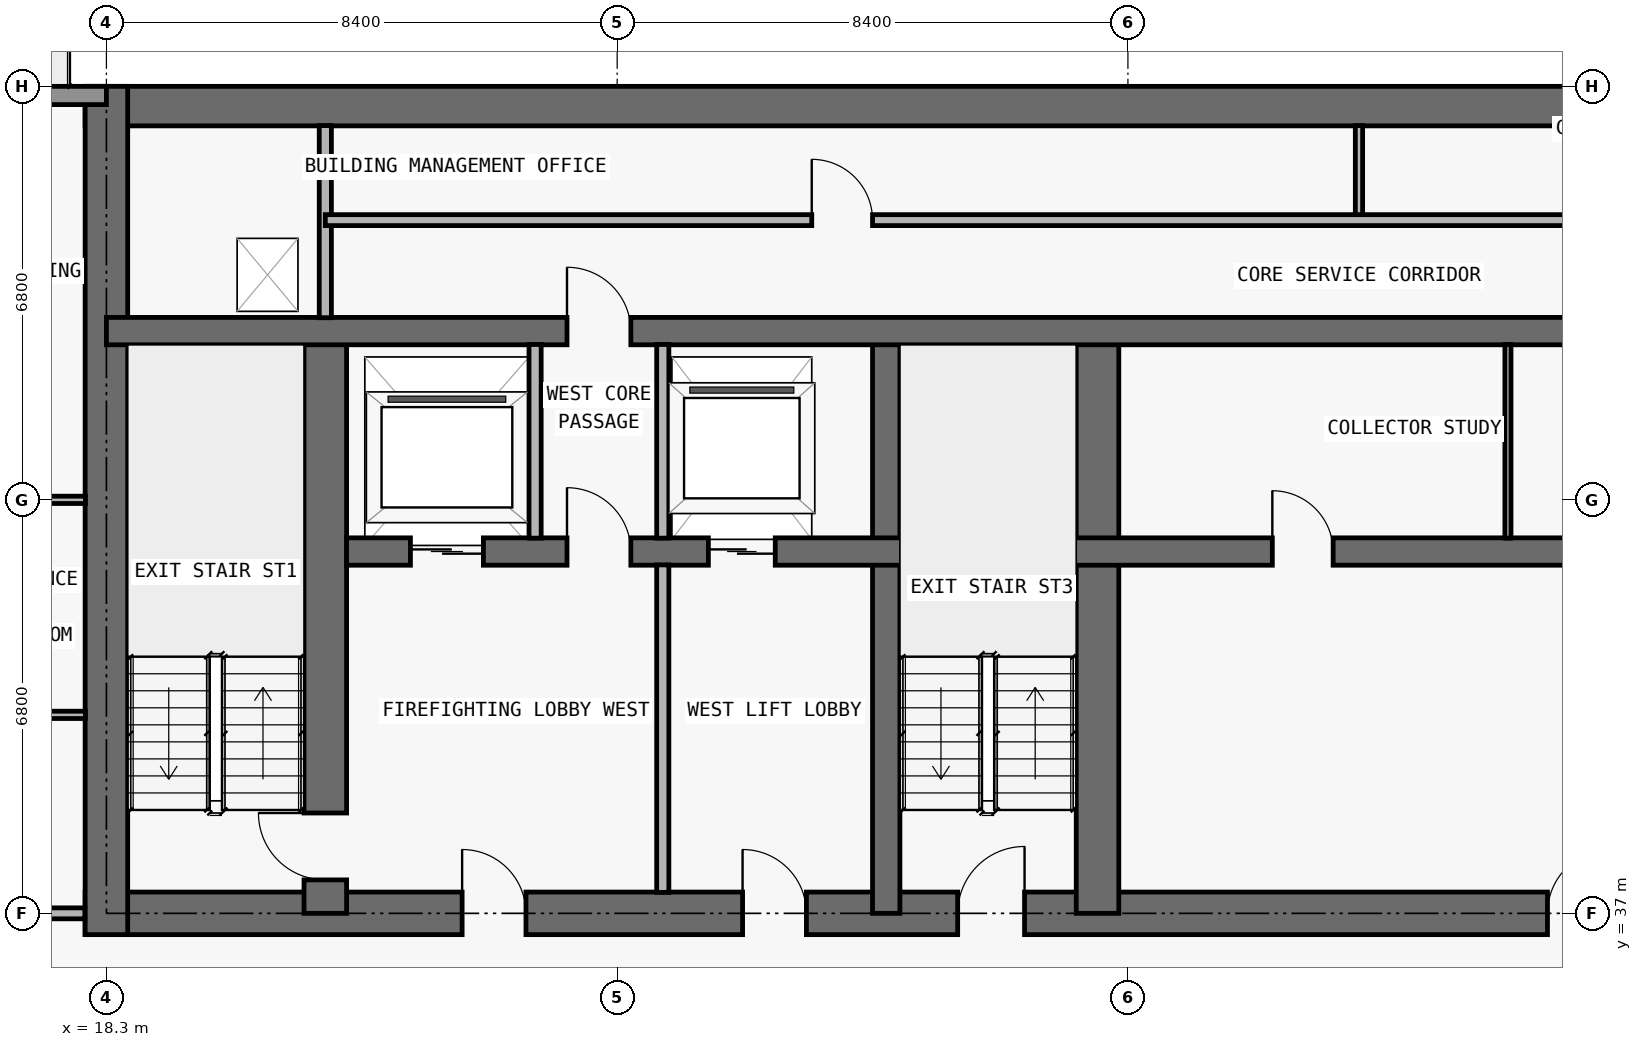
"""IFC4 building model, lengths in metres.
Left out: names, types, materials, properties, quantities, classifications, styles, units other than length and angle.
Written with IfcOpenShell. Run it as: python <this file> out.ifc"""

import sys

from ifc_helpers import new_model, si_unit, direction, frame, frame_2d, origin, place, context, subcontext, project, spatial, rectangle, extrude, element, fill, save


model = new_model("IFC4")
c1 = context("Model", 3, precision=1e-05, world=origin(), true_north=direction((0.0, 1.0)))
c2 = subcontext(c1, "Body", "Model", "MODEL_VIEW")
j1 = project(units=[si_unit("LENGTHUNIT", "METRE"), si_unit("PLANEANGLEUNIT", "RADIAN")], contexts=[c1])
p1 = place(None, origin())
s1 = spatial("IfcSite", under=j1, at=p1, CompositionType="ELEMENT")
p2 = place(p1, origin())
s2 = spatial("IfcBuilding", under=s1, at=p2, CompositionType="ELEMENT")
p3 = place(p2, frame((0.0, 0.0, 259.5)))
s3 = spatial("IfcBuildingStorey", under=s2, at=p3, CompositionType="ELEMENT", Elevation=259.5)
p4 = place(p3, frame((17.95, 37.0, 0.0), z_axis=(0.0, 0.0, 1.0), x_axis=(1.0, 0.0, 0.0)))
e1 = element("IfcWall", 1, at=p4, inside=s3, PredefinedType="SHEAR", context=c2, shape_type="SweptSolid", body=[
    extrude(rectangle(XDim=41.9, YDim=0.7, at=frame_2d((20.95, 0.0))), origin(), (0.0, 0.0, 1.0), 3.05),
])
p5 = place(p4, frame((14.35, 0.0, 0.0)))
e2 = element("IfcOpeningElement", 2, at=p5, cuts=e1, PredefinedType="OPENING", context=c2, shape_type="SweptSolid", body=[
    extrude(rectangle(XDim=1.1, YDim=2.15, at=frame_2d((0.55, 1.075))), frame((0.0, 0.36, 0.0), z_axis=(0.0, -1.0, 0.0), x_axis=(1.0, 0.0, 0.0)), (0.0, 0.0, 1.0), 0.72),
])
p6 = place(p4, frame((6.2, 0.0, 0.0)))
e3 = element("IfcOpeningElement", 3, at=p6, cuts=e1, PredefinedType="OPENING", context=c2, shape_type="SweptSolid", body=[
    extrude(rectangle(XDim=1.05, YDim=2.15, at=frame_2d((0.525, 1.075))), frame((0.0, 0.36, 0.0), z_axis=(0.0, -1.0, 0.0), x_axis=(1.0, 0.0, 0.0)), (0.0, 0.0, 1.0), 0.72),
])
p7 = place(p4, frame((34.7, 0.0, 0.0)))
e4 = element("IfcOpeningElement", 4, at=p7, cuts=e1, PredefinedType="OPENING", context=c2, shape_type="SweptSolid", body=[
    extrude(rectangle(XDim=1.05, YDim=2.15, at=frame_2d((0.525, 1.075))), frame((0.0, 0.36, 0.0), z_axis=(0.0, -1.0, 0.0), x_axis=(1.0, 0.0, 0.0)), (0.0, 0.0, 1.0), 0.72),
])
p8 = place(p4, frame((10.812, 0.0, 0.0)))
e5 = element("IfcOpeningElement", 5, at=p8, cuts=e1, PredefinedType="OPENING", context=c2, shape_type="SweptSolid", body=[
    extrude(rectangle(XDim=1.05, YDim=2.15, at=frame_2d((0.525, 1.075))), frame((0.0, 0.36, 0.0), z_axis=(0.0, -1.0, 0.0), x_axis=(1.0, 0.0, 0.0)), (0.0, 0.0, 1.0), 0.72),
])
p9 = place(p4, frame((24.05, 0.0, 0.0)))
e6 = element("IfcOpeningElement", 6, at=p9, cuts=e1, PredefinedType="OPENING", context=c2, shape_type="SweptSolid", body=[
    extrude(rectangle(XDim=1.05, YDim=2.15, at=frame_2d((0.525, 1.075))), frame((0.0, 0.36, 0.0), z_axis=(0.0, -1.0, 0.0), x_axis=(1.0, 0.0, 0.0)), (0.0, 0.0, 1.0), 0.72),
])
p10 = place(p3, frame((17.95, 50.275, 0.0), z_axis=(0.0, 0.0, 1.0), x_axis=(1.0, 0.0, 0.0)))
e7 = element("IfcWall", 7, at=p10, inside=s3, PredefinedType="SHEAR", context=c2, shape_type="SweptSolid", body=[
    extrude(rectangle(XDim=41.9, YDim=0.65, at=frame_2d((20.95, 0.0))), origin(), (0.0, 0.0, 1.0), 3.05),
])
p11 = place(p3, frame((18.3, 36.65, 0.0), z_axis=(0.0, 0.0, 1.0), x_axis=(0.0, 1.0, 0.0)))
e8 = element("IfcWall", 8, at=p11, inside=s3, PredefinedType="SHEAR", context=c2, shape_type="SweptSolid", body=[
    extrude(rectangle(XDim=13.95, YDim=0.7, at=frame_2d((6.975, 0.0))), origin(), (0.0, 0.0, 1.0), 3.05),
])
p12 = place(p3, frame((21.9, 37.0, 0.0), z_axis=(0.0, 0.0, 1.0), x_axis=(0.0, 1.0, 0.0)))
e9 = element("IfcWall", 9, at=p12, inside=s3, PredefinedType="SHEAR", context=c2, shape_type="SweptSolid", body=[
    extrude(rectangle(XDim=9.575, YDim=0.7, at=frame_2d((4.788, 0.0))), origin(), (0.0, 0.0, 1.0), 3.05),
])
p13 = place(p12, frame((0.55, 0.0, 0.0)))
e10 = element("IfcOpeningElement", 10, at=p13, cuts=e9, PredefinedType="OPENING", context=c2, shape_type="SweptSolid", body=[
    extrude(rectangle(XDim=1.1, YDim=2.15, at=frame_2d((0.55, 1.075))), frame((0.0, 0.36, 0.0), z_axis=(0.0, -1.0, 0.0), x_axis=(1.0, 0.0, 0.0)), (0.0, 0.0, 1.0), 0.72),
])
p14 = place(p3, frame((31.125, 37.0, 0.0), z_axis=(0.0, 0.0, 1.0), x_axis=(0.0, 1.0, 0.0)))
e11 = element("IfcWall", 11, at=p14, inside=s3, PredefinedType="SHEAR", context=c2, shape_type="SweptSolid", body=[
    extrude(rectangle(XDim=9.575, YDim=0.45, at=frame_2d((4.788, 0.0))), origin(), (0.0, 0.0, 1.0), 3.05),
])
p15 = place(p3, frame((34.6, 37.0, 0.0), z_axis=(0.0, 0.0, 1.0), x_axis=(0.0, 1.0, 0.0)))
e12 = element("IfcWall", 12, at=p15, inside=s3, PredefinedType="SHEAR", context=c2, shape_type="SweptSolid", body=[
    extrude(rectangle(XDim=9.575, YDim=0.7, at=frame_2d((4.788, 0.0))), origin(), (0.0, 0.0, 1.0), 3.05),
])
p16 = place(p3, frame((22.25, 42.95, 0.0), z_axis=(0.0, 0.0, 1.0), x_axis=(1.0, 0.0, 0.0)))
e13 = element("IfcWall", 13, at=p16, inside=s3, PredefinedType="SHEAR", context=c2, shape_type="SweptSolid", body=[
    extrude(rectangle(XDim=33.3, YDim=0.45, at=frame_2d((16.65, 0.0))), origin(), (0.0, 0.0, 1.0), 3.05),
])
p17 = place(p16, frame((1.05, 0.0, 0.0)))
e14 = element("IfcOpeningElement", 14, at=p17, cuts=e13, PredefinedType="OPENING", context=c2, shape_type="SweptSolid", body=[
    extrude(rectangle(XDim=1.2, YDim=2.2, at=frame_2d((0.6, 1.1))), frame((0.0, 0.235, 0.0), z_axis=(0.0, -1.0, 0.0), x_axis=(1.0, 0.0, 0.0)), (0.0, 0.0, 1.0), 0.47),
])
p18 = place(p16, frame((31.05, 0.0, 0.0)))
e15 = element("IfcOpeningElement", 15, at=p18, cuts=e13, PredefinedType="OPENING", context=c2, shape_type="SweptSolid", body=[
    extrude(rectangle(XDim=1.2, YDim=2.2, at=frame_2d((0.6, 1.1))), frame((0.0, 0.235, 0.0), z_axis=(0.0, -1.0, 0.0), x_axis=(1.0, 0.0, 0.0)), (0.0, 0.0, 1.0), 0.47),
])
p19 = place(p16, frame((26.45, 0.0, 0.0)))
e16 = element("IfcOpeningElement", 16, at=p19, cuts=e13, PredefinedType="OPENING", context=c2, shape_type="SweptSolid", body=[
    extrude(rectangle(XDim=1.1, YDim=2.2, at=frame_2d((0.55, 1.1))), frame((0.0, 0.235, 0.0), z_axis=(0.0, -1.0, 0.0), x_axis=(1.0, 0.0, 0.0)), (0.0, 0.0, 1.0), 0.47),
])
p20 = place(p16, frame((5.95, 0.0, 0.0)))
e17 = element("IfcOpeningElement", 17, at=p20, cuts=e13, PredefinedType="OPENING", context=c2, shape_type="SweptSolid", body=[
    extrude(rectangle(XDim=1.1, YDim=2.2, at=frame_2d((0.55, 1.1))), frame((0.0, 0.235, 0.0), z_axis=(0.0, -1.0, 0.0), x_axis=(1.0, 0.0, 0.0)), (0.0, 0.0, 1.0), 0.47),
])
p21 = place(p16, frame((3.625, 0.0, 0.0)))
e18 = element("IfcOpeningElement", 18, at=p21, cuts=e13, PredefinedType="OPENING", context=c2, shape_type="SweptSolid", body=[
    extrude(rectangle(XDim=1.05, YDim=2.15, at=frame_2d((0.525, 1.075))), frame((0.0, 0.235, 0.0), z_axis=(0.0, -1.0, 0.0), x_axis=(1.0, 0.0, 0.0)), (0.0, 0.0, 1.0), 0.47),
])
p22 = place(p16, frame((28.675, 0.0, 0.0)))
e19 = element("IfcOpeningElement", 19, at=p22, cuts=e13, PredefinedType="OPENING", context=c2, shape_type="SweptSolid", body=[
    extrude(rectangle(XDim=1.05, YDim=2.15, at=frame_2d((0.525, 1.075))), frame((0.0, 0.235, 0.0), z_axis=(0.0, -1.0, 0.0), x_axis=(1.0, 0.0, 0.0)), (0.0, 0.0, 1.0), 0.47),
])
p23 = place(p16, frame((15.225, 0.0, 0.0)))
e20 = element("IfcOpeningElement", 20, at=p23, cuts=e13, PredefinedType="OPENING", context=c2, shape_type="SweptSolid", body=[
    extrude(rectangle(XDim=1.0, YDim=2.2, at=frame_2d((0.5, 1.1))), frame((0.0, 0.235, 0.0), z_axis=(0.0, -1.0, 0.0), x_axis=(1.0, 0.0, 0.0)), (0.0, 0.0, 1.0), 0.47),
])
p24 = place(p16, frame((21.975, 0.0, 0.0)))
e21 = element("IfcOpeningElement", 21, at=p24, cuts=e13, PredefinedType="OPENING", context=c2, shape_type="SweptSolid", body=[
    extrude(rectangle(XDim=1.0, YDim=2.2, at=frame_2d((0.5, 1.1))), frame((0.0, 0.235, 0.0), z_axis=(0.0, -1.0, 0.0), x_axis=(1.0, 0.0, 0.0)), (0.0, 0.0, 1.0), 0.47),
])
p25 = place(p3, frame((18.3, 46.575, 0.0), z_axis=(0.0, 0.0, 1.0), x_axis=(1.0, 0.0, 0.0)))
e22 = element("IfcWall", 22, at=p25, inside=s3, PredefinedType="SHEAR", context=c2, shape_type="SweptSolid", body=[
    extrude(rectangle(XDim=41.2, YDim=0.45, at=frame_2d((20.6, 0.0))), origin(), (0.0, 0.0, 1.0), 3.05),
])
p26 = place(p25, frame((7.575, 0.0, 0.0)))
e23 = element("IfcOpeningElement", 23, at=p26, cuts=e22, PredefinedType="OPENING", context=c2, shape_type="SweptSolid", body=[
    extrude(rectangle(XDim=1.05, YDim=2.15, at=frame_2d((0.525, 1.075))), frame((0.0, 0.235, 0.0), z_axis=(0.0, -1.0, 0.0), x_axis=(1.0, 0.0, 0.0)), (0.0, 0.0, 1.0), 0.47),
])
p27 = place(p25, frame((32.625, 0.0, 0.0)))
e24 = element("IfcOpeningElement", 24, at=p27, cuts=e22, PredefinedType="OPENING", context=c2, shape_type="SweptSolid", body=[
    extrude(rectangle(XDim=1.05, YDim=2.15, at=frame_2d((0.525, 1.075))), frame((0.0, 0.235, 0.0), z_axis=(0.0, -1.0, 0.0), x_axis=(1.0, 0.0, 0.0)), (0.0, 0.0, 1.0), 0.47),
])
p28 = place(p3, frame((12.1, 50.45, 0.0), z_axis=(0.0, 0.0, 1.0), x_axis=(1.0, 0.0, 0.0)))
e25 = element("IfcWall", 25, at=p28, inside=s3, PredefinedType="STANDARD", context=c2, shape_type="SweptSolid", body=[
    extrude(rectangle(XDim=6.2, YDim=0.3, at=frame_2d((3.1, 0.0))), origin(), (0.0, 0.0, 1.0), 3.05),
])
p29 = place(p28, frame((2.1, 0.0, 0.0)))
e26 = element("IfcOpeningElement", 26, at=p29, cuts=e25, PredefinedType="OPENING", context=c2, shape_type="SweptSolid", body=[
    extrude(rectangle(XDim=2.0, YDim=2.3, at=frame_2d((1.0, 1.15))), frame((0.0, 0.16, 0.0), z_axis=(0.0, -1.0, 0.0), x_axis=(1.0, 0.0, 0.0)), (0.0, 0.0, 1.0), 0.32),
])
p30 = place(p3, frame((21.9, 46.795, 0.0), z_axis=(0.0, 0.0, 1.0), x_axis=(0.0, 1.0, 0.0)))
e27 = element("IfcWall", 27, at=p30, inside=s3, PredefinedType="PARTITIONING", context=c2, shape_type="SweptSolid", body=[
    extrude(rectangle(XDim=3.16, YDim=0.2, at=frame_2d((1.58, 0.0))), origin(), (0.0, 0.0, 1.0), 3.05),
])
p31 = place(p3, frame((25.35, 43.17, 0.0), z_axis=(0.0, 0.0, 1.0), x_axis=(0.0, 1.0, 0.0)))
e28 = element("IfcWall", 28, at=p31, inside=s3, PredefinedType="PARTITIONING", context=c2, shape_type="SweptSolid", body=[
    extrude(rectangle(XDim=3.185, YDim=0.2, at=frame_2d((1.593, 0.0))), origin(), (0.0, 0.0, 1.0), 3.05),
])
p32 = place(p3, frame((27.45, 37.345, 0.0), z_axis=(0.0, 0.0, 1.0), x_axis=(0.0, 1.0, 0.0)))
e29 = element("IfcWall", 29, at=p32, inside=s3, PredefinedType="PARTITIONING", context=c2, shape_type="SweptSolid", body=[
    extrude(rectangle(XDim=5.385, YDim=0.2, at=frame_2d((2.692, 0.0))), origin(), (0.0, 0.0, 1.0), 3.05),
])
p33 = place(p3, frame((27.45, 43.17, 0.0), z_axis=(0.0, 0.0, 1.0), x_axis=(0.0, 1.0, 0.0)))
e30 = element("IfcWall", 30, at=p33, inside=s3, PredefinedType="PARTITIONING", context=c2, shape_type="SweptSolid", body=[
    extrude(rectangle(XDim=3.185, YDim=0.2, at=frame_2d((1.593, 0.0))), origin(), (0.0, 0.0, 1.0), 3.05),
])
p34 = place(p3, frame((38.9, 48.4, 0.0), z_axis=(0.0, 0.0, 1.0), x_axis=(0.0, 1.0, 0.0)))
e31 = element("IfcWall", 31, at=p34, inside=s3, PredefinedType="PARTITIONING", context=c2, shape_type="SweptSolid", body=[
    extrude(rectangle(XDim=1.555, YDim=0.12, at=frame_2d((0.778, 0.0))), origin(), (0.0, 0.0, 1.0), 3.05),
])
p35 = place(p3, frame((41.35, 43.17, 0.0), z_axis=(0.0, 0.0, 1.0), x_axis=(0.0, 1.0, 0.0)))
e32 = element("IfcWall", 32, at=p35, inside=s3, PredefinedType="MOVABLE", context=c2, shape_type="SweptSolid", body=[
    extrude(rectangle(XDim=3.185, YDim=0.1, at=frame_2d((1.593, 0.0))), origin(), (0.0, 0.0, 1.0), 3.05),
])
p36 = place(p3, frame((12.1, 37.0, 0.0), z_axis=(0.0, 0.0, 1.0), x_axis=(1.0, 0.0, 0.0)))
e33 = element("IfcWall", 33, at=p36, inside=s3, PredefinedType="PARTITIONING", context=c2, shape_type="SweptSolid", body=[
    extrude(rectangle(XDim=5.845, YDim=0.18, at=frame_2d((2.922, 0.0))), origin(), (0.0, 0.0, 1.0), 3.05),
])
p37 = place(p36, frame((1.275, 0.0, 0.0)))
e34 = element("IfcOpeningElement", 34, at=p37, cuts=e33, PredefinedType="OPENING", context=c2, shape_type="SweptSolid", body=[
    extrude(rectangle(XDim=1.0, YDim=2.2, at=frame_2d((0.5, 1.1))), frame((0.0, 0.1, 0.0), z_axis=(0.0, -1.0, 0.0), x_axis=(1.0, 0.0, 0.0)), (0.0, 0.0, 1.0), 0.2),
])
p38 = place(p3, frame((15.65, 40.264, 0.0), z_axis=(0.0, 0.0, 1.0), x_axis=(1.0, 0.0, 0.0)))
e35 = element("IfcWall", 35, at=p38, inside=s3, PredefinedType="PARTITIONING", context=c2, shape_type="SweptSolid", body=[
    extrude(rectangle(XDim=2.305, YDim=0.12, at=frame_2d((1.153, 0.0))), origin(), (0.0, 0.0, 1.0), 3.05),
])
p39 = place(p3, frame((8.395, 43.8, 0.0), z_axis=(0.0, 0.0, 1.0), x_axis=(1.0, 0.0, 0.0)))
e36 = element("IfcWall", 36, at=p39, inside=s3, PredefinedType="PARTITIONING", context=c2, shape_type="SweptSolid", body=[
    extrude(rectangle(XDim=9.56, YDim=0.12, at=frame_2d((4.78, 0.0))), origin(), (0.0, 0.0, 1.0), 2.418),
])
p40 = place(p39, frame((5.03, 0.0, 0.0)))
e37 = element("IfcOpeningElement", 37, at=p40, cuts=e36, PredefinedType="OPENING", context=c2, shape_type="SweptSolid", body=[
    extrude(rectangle(XDim=0.9, YDim=2.15, at=frame_2d((0.45, 1.075))), frame((0.0, 0.07, 0.0), z_axis=(0.0, -1.0, 0.0), x_axis=(1.0, 0.0, 0.0)), (0.0, 0.0, 1.0), 0.14),
])
p41 = place(p39, frame((7.982, 0.0, 0.0)))
e38 = element("IfcOpeningElement", 38, at=p41, cuts=e36, PredefinedType="OPENING", context=c2, shape_type="SweptSolid", body=[
    extrude(rectangle(XDim=0.85, YDim=2.1, at=frame_2d((0.425, 1.05))), frame((0.0, 0.07, 0.0), z_axis=(0.0, -1.0, 0.0), x_axis=(1.0, 0.0, 0.0)), (0.0, 0.0, 1.0), 0.14),
])
p42 = place(p3, frame((21.9, 48.4, 0.0), z_axis=(0.0, 0.0, 1.0), x_axis=(1.0, 0.0, 0.0)))
e39 = element("IfcWall", 39, at=p42, inside=s3, PredefinedType="PARTITIONING", context=c2, shape_type="SweptSolid", body=[
    extrude(rectangle(XDim=34.0, YDim=0.18, at=frame_2d((17.0, 0.0))), origin(), (0.0, 0.0, 1.0), 3.05),
])
p43 = place(p42, frame((8.0, 0.0, 0.0)))
e40 = element("IfcOpeningElement", 40, at=p43, cuts=e39, PredefinedType="OPENING", context=c2, shape_type="SweptSolid", body=[
    extrude(rectangle(XDim=1.0, YDim=2.2, at=frame_2d((0.5, 1.1))), frame((0.0, 0.1, 0.0), z_axis=(0.0, -1.0, 0.0), x_axis=(1.0, 0.0, 0.0)), (0.0, 0.0, 1.0), 0.2),
])
p44 = place(p42, frame((25.0, 0.0, 0.0)))
e41 = element("IfcOpeningElement", 41, at=p44, cuts=e39, PredefinedType="OPENING", context=c2, shape_type="SweptSolid", body=[
    extrude(rectangle(XDim=1.0, YDim=2.2, at=frame_2d((0.5, 1.1))), frame((0.0, 0.1, 0.0), z_axis=(0.0, -1.0, 0.0), x_axis=(1.0, 0.0, 0.0)), (0.0, 0.0, 1.0), 0.2),
])
p45 = place(p17, origin())
e42 = element("IfcDoor", 42, at=p45, inside=s3, OperationType="DOUBLE_DOOR_SLIDING", PredefinedType="DOOR", context=c2, shape_type="SweptSolid", body=[
    extrude(rectangle(XDim=1.2, YDim=2.2, at=frame_2d((0.6, 1.1))), frame((0.0, 0.025, 0.0), z_axis=(0.0, -1.0, 0.0), x_axis=(1.0, 0.0, 0.0)), (0.0, 0.0, 1.0), 0.05),
])
fill(e14, e42)
p46 = place(p20, origin())
e43 = element("IfcDoor", 43, at=p46, inside=s3, OperationType="DOUBLE_DOOR_SLIDING", PredefinedType="DOOR", context=c2, shape_type="SweptSolid", body=[
    extrude(rectangle(XDim=1.1, YDim=2.2, at=frame_2d((0.55, 1.1))), frame((0.0, 0.025, 0.0), z_axis=(0.0, -1.0, 0.0), x_axis=(1.0, 0.0, 0.0)), (0.0, 0.0, 1.0), 0.05),
])
fill(e17, e43)
p47 = place(p5, origin())
e44 = element("IfcDoor", 44, at=p47, inside=s3, OperationType="SINGLE_SWING_RIGHT", PredefinedType="DOOR", context=c2, shape_type="SweptSolid", body=[
    extrude(rectangle(XDim=1.1, YDim=2.15, at=frame_2d((0.55, 1.075))), frame((0.0, 0.025, 0.0), z_axis=(0.0, -1.0, 0.0), x_axis=(1.0, 0.0, 0.0)), (0.0, 0.0, 1.0), 0.05),
])
fill(e2, e44)
p48 = place(p6, origin())
e45 = element("IfcDoor", 45, at=p48, inside=s3, OperationType="SINGLE_SWING_LEFT", PredefinedType="DOOR", context=c2, shape_type="SweptSolid", body=[
    extrude(rectangle(XDim=1.05, YDim=2.15, at=frame_2d((0.525, 1.075))), frame((0.0, 0.025, 0.0), z_axis=(0.0, -1.0, 0.0), x_axis=(1.0, 0.0, 0.0)), (0.0, 0.0, 1.0), 0.05),
])
fill(e3, e45)
p49 = place(p13, origin())
e46 = element("IfcDoor", 46, at=p49, inside=s3, OperationType="SINGLE_SWING_RIGHT", PredefinedType="DOOR", context=c2, shape_type="SweptSolid", body=[
    extrude(rectangle(XDim=1.1, YDim=2.15, at=frame_2d((0.55, 1.075))), frame((0.0, 0.025, 0.0), z_axis=(0.0, -1.0, 0.0), x_axis=(1.0, 0.0, 0.0)), (0.0, 0.0, 1.0), 0.05),
])
fill(e10, e46)
p50 = place(p21, origin())
e47 = element("IfcDoor", 47, at=p50, inside=s3, OperationType="SINGLE_SWING_LEFT", PredefinedType="DOOR", context=c2, shape_type="SweptSolid", body=[
    extrude(rectangle(XDim=1.05, YDim=2.15, at=frame_2d((0.525, 1.075))), frame((0.0, 0.025, 0.0), z_axis=(0.0, -1.0, 0.0), x_axis=(1.0, 0.0, 0.0)), (0.0, 0.0, 1.0), 0.05),
])
fill(e18, e47)
p51 = place(p8, origin())
e48 = element("IfcDoor", 48, at=p51, inside=s3, OperationType="SINGLE_SWING_LEFT", PredefinedType="DOOR", context=c2, shape_type="SweptSolid", body=[
    extrude(rectangle(XDim=1.05, YDim=2.15, at=frame_2d((0.525, 1.075))), frame((0.0, 0.025, 0.0), z_axis=(0.0, -1.0, 0.0), x_axis=(1.0, 0.0, 0.0)), (0.0, 0.0, 1.0), 0.05),
])
fill(e5, e48)
p52 = place(p9, origin())
e49 = element("IfcDoor", 49, at=p52, inside=s3, OperationType="SINGLE_SWING_RIGHT", PredefinedType="DOOR", context=c2, shape_type="SweptSolid", body=[
    extrude(rectangle(XDim=1.05, YDim=2.15, at=frame_2d((0.525, 1.075))), frame((0.0, 0.025, 0.0), z_axis=(0.0, -1.0, 0.0), x_axis=(1.0, 0.0, 0.0)), (0.0, 0.0, 1.0), 0.05),
])
fill(e6, e49)
p53 = place(p23, origin())
e50 = element("IfcDoor", 50, at=p53, inside=s3, OperationType="SINGLE_SWING_LEFT", PredefinedType="DOOR", context=c2, shape_type="SweptSolid", body=[
    extrude(rectangle(XDim=1.0, YDim=2.2, at=frame_2d((0.5, 1.1))), frame((0.0, 0.025, 0.0), z_axis=(0.0, -1.0, 0.0), x_axis=(1.0, 0.0, 0.0)), (0.0, 0.0, 1.0), 0.05),
])
fill(e20, e50)
p54 = place(p26, origin())
e51 = element("IfcDoor", 51, at=p54, inside=s3, OperationType="SINGLE_SWING_LEFT", PredefinedType="DOOR", context=c2, shape_type="SweptSolid", body=[
    extrude(rectangle(XDim=1.05, YDim=2.15, at=frame_2d((0.525, 1.075))), frame((0.0, 0.025, 0.0), z_axis=(0.0, -1.0, 0.0), x_axis=(1.0, 0.0, 0.0)), (0.0, 0.0, 1.0), 0.05),
])
fill(e23, e51)
p55 = place(p43, origin())
e52 = element("IfcDoor", 52, at=p55, inside=s3, OperationType="SINGLE_SWING_LEFT", PredefinedType="DOOR", context=c2, shape_type="SweptSolid", body=[
    extrude(rectangle(XDim=1.0, YDim=2.2, at=frame_2d((0.5, 1.1))), frame((0.0, 0.025, 0.0), z_axis=(0.0, -1.0, 0.0), x_axis=(1.0, 0.0, 0.0)), (0.0, 0.0, 1.0), 0.05),
])
fill(e40, e52)
save(model, sys.argv[1])
